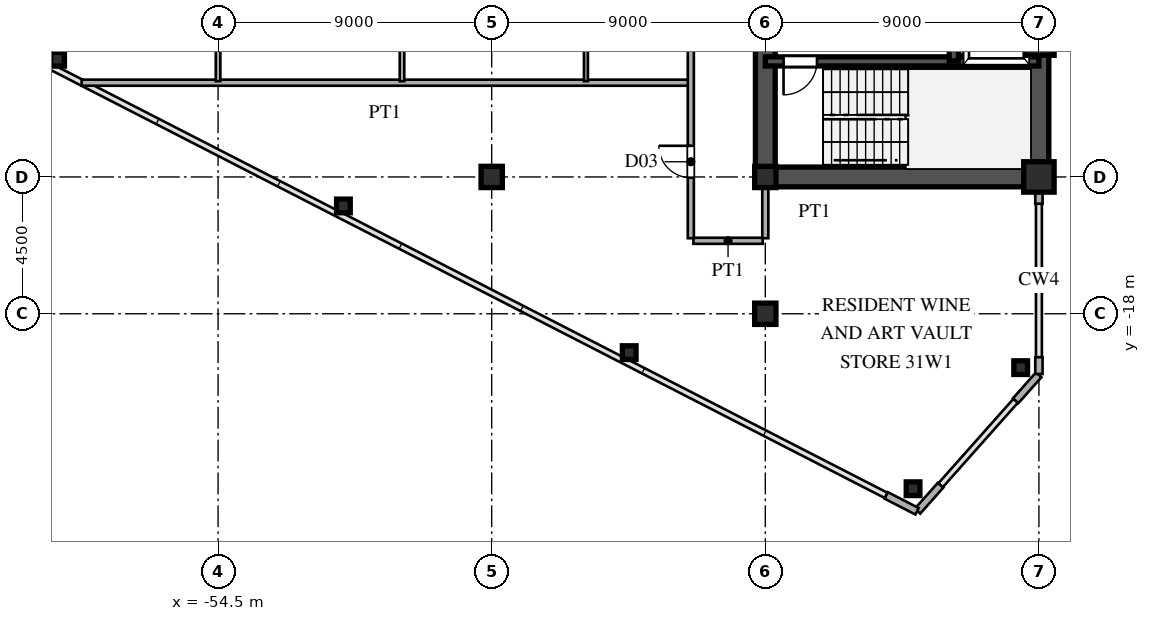
"""IFC4 building model, lengths in metres.
Left out: names, types, materials, properties, quantities, classifications, styles, units other than length and angle.
Written with IfcOpenShell. Run it as: python <this file> out.ifc"""

import sys

from ifc_helpers import new_model, si_unit, direction, frame, frame_2d, origin, origin_2d, place, context, subcontext, project, spatial, rectangle, hollow_rectangle, i_section, extrude, source, transform, mapped, element, fill, save


model = new_model("IFC4")
c1 = context("Model", 3, precision=1e-05, world=origin(), true_north=direction((0.0, 1.0)))
c2 = subcontext(c1, "Body", "Model", "MODEL_VIEW")
j1 = project(units=[si_unit("LENGTHUNIT", "METRE"), si_unit("PLANEANGLEUNIT", "RADIAN")], contexts=[c1])
p1 = place(None, origin())
s1 = spatial("IfcSite", under=j1, at=p1, CompositionType="ELEMENT")
p2 = place(p1, origin())
s2 = spatial("IfcBuilding", under=s1, at=p2, CompositionType="ELEMENT")
p3 = place(p2, frame((0.0, 0.0, 117.6)))
s3 = spatial("IfcBuildingStorey", under=s2, at=p3, CompositionType="ELEMENT", Elevation=117.6)
m1 = source(origin(), c2, "Body", "SweptSolid", [
    extrude(hollow_rectangle(XDim=1.0, YDim=1.0, WallThickness=0.042, at=origin_2d()), origin(), (0.0, 0.0, 1.0), 3.6),
])
for number, where, z_axis, x_axis in (
    (1, (-27.5, -13.5, 0.0), (0.0, 0.0, 1.0), (1.0, 0.0, 0.0)),
    (2, (-27.5, -9.0, 0.0), (0.0, 0.0, 1.0), (1.0, 0.0, 0.0)),
):
    element("IfcColumn", number, at=place(p3, frame(where, z_axis=z_axis, x_axis=x_axis)), inside=s3, PredefinedType="COLUMN", context=c2, shape_type="MappedRepresentation", body=[
        mapped(m1, transform((0.0, 0.0, 0.0), scale=1.0)),
    ])
m2 = source(origin(), c2, "Body", "SweptSolid", [
    extrude(i_section(OverallWidth=0.7, OverallDepth=0.7, WebThickness=0.028, FlangeThickness=0.045, at=origin_2d()), origin(), (0.0, 0.0, 1.0), 3.6),
])
for number, where, z_axis, x_axis in (
    (3, (-36.5, -18.0, 0.0), (0.0, 0.0, 1.0), (1.0, 0.0, 0.0)),
    (4, (-36.5, -13.5, 0.0), (0.0, 0.0, 1.0), (1.0, 0.0, 0.0)),
    (5, (-45.5, -13.5, 0.0), (0.0, 0.0, 1.0), (1.0, 0.0, 0.0)),
):
    element("IfcColumn", number, at=place(p3, frame(where, z_axis=z_axis, x_axis=x_axis)), inside=s3, PredefinedType="COLUMN", context=c2, shape_type="MappedRepresentation", body=[
        mapped(m2, transform((0.0, 0.0, 0.0), scale=1.0)),
    ])
m3 = source(origin(), c2, "Body", "SweptSolid", [
    extrude(hollow_rectangle(XDim=0.45, YDim=0.45, WallThickness=0.018, at=origin_2d()), origin(), (0.0, 0.0, 1.0), 3.6),
])
for number, where, z_axis, x_axis in (
    (6, (-28.1, -19.772, 0.0), (0.0, 0.0, 1.0), (1.0, 0.0, 0.0)),
    (7, (-31.64, -23.754, 0.0), (0.0, 0.0, 1.0), (1.0, 0.0, 0.0)),
    (8, (-40.976, -19.278, 0.0), (0.0, 0.0, 1.0), (1.0, 0.0, 0.0)),
    (9, (-50.377, -14.453, 0.0), (0.0, 0.0, 1.0), (1.0, 0.0, 0.0)),
    (10, (-59.779, -9.629, 0.0), (0.0, 0.0, 1.0), (1.0, 0.0, 0.0)),
):
    element("IfcColumn", number, at=place(p3, frame(where, z_axis=z_axis, x_axis=x_axis)), inside=s3, PredefinedType="COLUMN", context=c2, shape_type="MappedRepresentation", body=[
        mapped(m3, transform((0.0, 0.0, 0.0), scale=1.0)),
    ])
p4 = place(p3, frame((-27.5, -19.98, 0.0), z_axis=(0.0, 0.0, 1.0), x_axis=(0.0, 1.0, 0.0)))
e11 = element("IfcWall", 11, at=p4, inside=s3, PredefinedType="SOLIDWALL", context=c2, shape_type="SweptSolid", body=[
    extrude(rectangle(XDim=0.55, YDim=0.24, at=frame_2d((0.275, 0.0))), origin(), (0.0, 0.0, 1.0), 3.38),
])
p5 = place(p3, frame((-27.5, -14.38, 0.0), z_axis=(0.0, 0.0, 1.0), x_axis=(0.0, 1.0, 0.0)))
e12 = element("IfcWall", 12, at=p5, inside=s3, PredefinedType="SOLIDWALL", context=c2, shape_type="SweptSolid", body=[
    extrude(rectangle(XDim=0.55, YDim=0.24, at=frame_2d((0.275, 0.0))), origin(), (0.0, 0.0, 1.0), 2.88),
])
p6 = place(p3, frame((-32.523, -23.975, 0.0), z_axis=(0.0, 0.0, 1.0), x_axis=(0.889797395748, -0.456355776255, 0.0)))
e13 = element("IfcWall", 13, at=p6, inside=s3, PredefinedType="SOLIDWALL", context=c2, shape_type="SweptSolid", body=[
    extrude(rectangle(XDim=1.14, YDim=0.24, at=frame_2d((0.57, 0.0))), origin(), (0.0, 0.0, 1.0), 3.38),
])
for number, where, z_axis, x_axis in (
    (14, (-31.493, -24.492, 0.0), (0.0, 0.0, 1.0), (0.664, 0.747, 0.0)),
    (15, (-28.264, -20.86, 0.0), (0.0, 0.0, 1.0), (0.664, 0.747, 0.0)),
):
    element("IfcWall", number, at=place(p3, frame(where, z_axis=z_axis, x_axis=x_axis)), inside=s3, PredefinedType="SOLIDWALL", context=c2, shape_type="SweptSolid", body=[
        extrude(rectangle(XDim=1.14, YDim=0.24, at=frame_2d((0.57, 0.0))), origin(), (0.0, 0.0, 1.0), 3.38),
    ])
p7 = place(p3, frame((-27.5, -13.5, 0.0), z_axis=(0.0, 0.0, 1.0), x_axis=(0.0, 1.0, 0.0)))
e16 = element("IfcWall", 16, at=p7, inside=s3, PredefinedType="SHEAR", context=c2, shape_type="SweptSolid", body=[
    extrude(rectangle(XDim=12.2, YDim=0.65, at=frame_2d((6.1, 0.0))), origin(), (0.0, 0.0, 1.0), 3.38),
])
p8 = place(p3, frame((-36.5, -13.5, 0.0), z_axis=(0.0, 0.0, 1.0), x_axis=(1.0, 0.0, 0.0)))
e17 = element("IfcWall", 17, at=p8, inside=s3, PredefinedType="SHEAR", context=c2, shape_type="SweptSolid", body=[
    extrude(rectangle(XDim=9.0, YDim=0.65, at=frame_2d((4.5, 0.0))), origin(), (0.0, 0.0, 1.0), 3.38),
])
p9 = place(p3, frame((-36.5, -13.65, 0.0), z_axis=(0.0, 0.0, 1.0), x_axis=(0.0, 1.0, 0.0)))
e18 = element("IfcWall", 18, at=p9, inside=s3, PredefinedType="SHEAR", context=c2, shape_type="SweptSolid", body=[
    extrude(rectangle(XDim=7.15, YDim=0.65, at=frame_2d((3.575, 0.0))), origin(), (0.0, 0.0, 1.0), 3.38),
])
p10 = place(p9, frame((4.675, 0.0, 0.0)))
e19 = element("IfcOpeningElement", 19, at=p10, cuts=e18, PredefinedType="OPENING", context=c2, shape_type="SweptSolid", body=[
    extrude(rectangle(XDim=1.15, YDim=2.2, at=frame_2d((0.575, 1.1))), frame((0.0, 0.335, 0.0), z_axis=(0.0, -1.0, 0.0), x_axis=(1.0, 0.0, 0.0)), (0.0, 0.0, 1.0), 0.67),
])
p11 = place(p3, frame((-36.5, -9.7, 0.0), z_axis=(0.0, 0.0, 1.0), x_axis=(1.0, 0.0, 0.0)))
e20 = element("IfcWall", 20, at=p11, inside=s3, PredefinedType="SHEAR", context=c2, shape_type="SweptSolid", body=[
    extrude(rectangle(XDim=9.0, YDim=0.3, at=frame_2d((4.5, 0.0))), origin(), (0.0, 0.0, 1.0), 3.38),
])
p12 = place(p11, frame((0.6, 0.0, 0.0)))
e21 = element("IfcOpeningElement", 21, at=p12, cuts=e20, PredefinedType="OPENING", context=c2, shape_type="SweptSolid", body=[
    extrude(rectangle(XDim=1.1, YDim=2.2, at=frame_2d((0.55, 1.1))), frame((0.0, 0.16, 0.0), z_axis=(0.0, -1.0, 0.0), x_axis=(1.0, 0.0, 0.0)), (0.0, 0.0, 1.0), 0.32),
])
p13 = place(p3, frame((-30.3, -9.68, 0.0), z_axis=(0.0, 0.0, 1.0), x_axis=(0.0, 1.0, 0.0)))
e22 = element("IfcWall", 22, at=p13, inside=s3, PredefinedType="SHEAR", context=c2, shape_type="SweptSolid", body=[
    extrude(rectangle(XDim=2.56, YDim=0.3, at=frame_2d((1.28, 0.0))), origin(), (0.0, 0.0, 1.0), 3.38),
])
p14 = place(p13, frame((0.68, 0.0, 0.0)))
e23 = element("IfcOpeningElement", 23, at=p14, cuts=e22, PredefinedType="OPENING", context=c2, shape_type="SweptSolid", body=[
    extrude(rectangle(XDim=1.2, YDim=2.25, at=frame_2d((0.6, 1.125))), frame((0.0, 0.16, 0.0), z_axis=(0.0, -1.0, 0.0), x_axis=(1.0, 0.0, 0.0)), (0.0, 0.0, 1.0), 0.32),
])
p15 = place(p3, frame((-38.865, -15.6, 0.0), z_axis=(0.0, 0.0, 1.0), x_axis=(1.0, 0.0, 0.0)))
e24 = element("IfcWall", 24, at=p15, inside=s3, PredefinedType="PARTITIONING", context=c2, shape_type="SweptSolid", body=[
    extrude(rectangle(XDim=2.28, YDim=0.2, at=frame_2d((1.14, 0.0))), origin(), (0.0, 0.0, 1.0), 3.38),
])
p16 = place(p3, frame((-58.988, -10.4, 0.0), z_axis=(0.0, 0.0, 1.0), x_axis=(1.0, 0.0, 0.0)))
e25 = element("IfcWall", 25, at=p16, inside=s3, PredefinedType="PARTITIONING", context=c2, shape_type="SweptSolid", body=[
    extrude(rectangle(XDim=19.958, YDim=0.2, at=frame_2d((9.979, 0.0))), origin(), (0.0, 0.0, 1.0), 3.38),
])
p17 = place(p3, frame((-54.5, -10.35, 0.0), z_axis=(0.0, 0.0, 1.0), x_axis=(0.0, 1.0, 0.0)))
e26 = element("IfcWall", 26, at=p17, inside=s3, PredefinedType="PARTITIONING", context=c2, shape_type="SweptSolid", body=[
    extrude(rectangle(XDim=23.082, YDim=0.15, at=frame_2d((11.541, 0.0))), origin(), (0.0, 0.0, 1.0), 2.78),
])
p18 = place(p17, frame((6.475, 0.0, 0.0)))
e27 = element("IfcOpeningElement", 27, at=p18, cuts=e26, PredefinedType="OPENING", context=c2, shape_type="SweptSolid", body=[
    extrude(rectangle(XDim=0.95, YDim=2.15, at=frame_2d((0.475, 1.075))), frame((0.0, 0.085, 0.0), z_axis=(0.0, -1.0, 0.0), x_axis=(1.0, 0.0, 0.0)), (0.0, 0.0, 1.0), 0.17),
])
p19 = place(p17, frame((11.142, 0.0, 0.0)))
e28 = element("IfcOpeningElement", 28, at=p19, cuts=e26, PredefinedType="OPENING", context=c2, shape_type="SweptSolid", body=[
    extrude(rectangle(XDim=0.95, YDim=2.15, at=frame_2d((0.475, 1.075))), frame((0.0, 0.085, 0.0), z_axis=(0.0, -1.0, 0.0), x_axis=(1.0, 0.0, 0.0)), (0.0, 0.0, 1.0), 0.17),
])
p20 = place(p17, frame((20.575, 0.0, 0.0)))
e29 = element("IfcOpeningElement", 29, at=p20, cuts=e26, PredefinedType="OPENING", context=c2, shape_type="SweptSolid", body=[
    extrude(rectangle(XDim=0.95, YDim=2.15, at=frame_2d((0.475, 1.075))), frame((0.0, 0.085, 0.0), z_axis=(0.0, -1.0, 0.0), x_axis=(1.0, 0.0, 0.0)), (0.0, 0.0, 1.0), 0.17),
])
p21 = place(p17, frame((16.026, 0.0, 0.0)))
e30 = element("IfcOpeningElement", 30, at=p21, cuts=e26, PredefinedType="OPENING", context=c2, shape_type="SweptSolid", body=[
    extrude(rectangle(XDim=0.95, YDim=2.15, at=frame_2d((0.475, 1.075))), frame((0.0, 0.085, 0.0), z_axis=(0.0, -1.0, 0.0), x_axis=(1.0, 0.0, 0.0)), (0.0, 0.0, 1.0), 0.17),
])
p22 = place(p3, frame((-48.45, -10.35, 0.0), z_axis=(0.0, 0.0, 1.0), x_axis=(0.0, 1.0, 0.0)))
e31 = element("IfcWall", 31, at=p22, inside=s3, PredefinedType="PARTITIONING", context=c2, shape_type="SweptSolid", body=[
    extrude(rectangle(XDim=24.104, YDim=0.15, at=frame_2d((12.052, 0.0))), origin(), (0.0, 0.0, 1.0), 3.38),
])
p23 = place(p22, frame((6.475, 0.0, 0.0)))
e32 = element("IfcOpeningElement", 32, at=p23, cuts=e31, PredefinedType="OPENING", context=c2, shape_type="SweptSolid", body=[
    extrude(rectangle(XDim=0.95, YDim=2.15, at=frame_2d((0.475, 1.075))), frame((0.0, 0.085, 0.0), z_axis=(0.0, -1.0, 0.0), x_axis=(1.0, 0.0, 0.0)), (0.0, 0.0, 1.0), 0.17),
])
p24 = place(p22, frame((1.808, 0.0, 0.0)))
e33 = element("IfcOpeningElement", 33, at=p24, cuts=e31, PredefinedType="OPENING", context=c2, shape_type="SweptSolid", body=[
    extrude(rectangle(XDim=0.95, YDim=2.15, at=frame_2d((0.475, 1.075))), frame((0.0, 0.085, 0.0), z_axis=(0.0, -1.0, 0.0), x_axis=(1.0, 0.0, 0.0)), (0.0, 0.0, 1.0), 0.17),
])
p25 = place(p22, frame((21.128, 0.0, 0.0)))
e34 = element("IfcOpeningElement", 34, at=p25, cuts=e31, PredefinedType="OPENING", context=c2, shape_type="SweptSolid", body=[
    extrude(rectangle(XDim=0.95, YDim=2.15, at=frame_2d((0.475, 1.075))), frame((0.0, 0.085, 0.0), z_axis=(0.0, -1.0, 0.0), x_axis=(1.0, 0.0, 0.0)), (0.0, 0.0, 1.0), 0.17),
])
p26 = place(p22, frame((16.026, 0.0, 0.0)))
e35 = element("IfcOpeningElement", 35, at=p26, cuts=e31, PredefinedType="OPENING", context=c2, shape_type="SweptSolid", body=[
    extrude(rectangle(XDim=0.95, YDim=2.15, at=frame_2d((0.475, 1.075))), frame((0.0, 0.085, 0.0), z_axis=(0.0, -1.0, 0.0), x_axis=(1.0, 0.0, 0.0)), (0.0, 0.0, 1.0), 0.17),
])
p27 = place(p3, frame((-42.4, -10.35, 0.0), z_axis=(0.0, 0.0, 1.0), x_axis=(0.0, 1.0, 0.0)))
e36 = element("IfcWall", 36, at=p27, inside=s3, PredefinedType="PARTITIONING", context=c2, shape_type="SweptSolid", body=[
    extrude(rectangle(XDim=9.233, YDim=0.13, at=frame_2d((4.617, 0.0))), origin(), (0.0, 0.0, 1.0), 3.38),
])
p28 = place(p27, frame((6.475, 0.0, 0.0)))
e37 = element("IfcOpeningElement", 37, at=p28, cuts=e36, PredefinedType="OPENING", context=c2, shape_type="SweptSolid", body=[
    extrude(rectangle(XDim=0.95, YDim=2.15, at=frame_2d((0.475, 1.075))), frame((0.0, 0.075, 0.0), z_axis=(0.0, -1.0, 0.0), x_axis=(1.0, 0.0, 0.0)), (0.0, 0.0, 1.0), 0.15),
])
p29 = place(p3, frame((-38.95, -15.515, 0.0), z_axis=(0.0, 0.0, 1.0), x_axis=(0.0, 1.0, 0.0)))
e38 = element("IfcWall", 38, at=p29, inside=s3, PredefinedType="PARTITIONING", context=c2, shape_type="SweptSolid", body=[
    extrude(rectangle(XDim=31.03, YDim=0.2, at=frame_2d((15.515, 0.0))), origin(), (0.0, 0.0, 1.0), 3.38),
])
p30 = place(p29, frame((1.99, 0.0, 0.0)))
e39 = element("IfcOpeningElement", 39, at=p30, cuts=e38, PredefinedType="OPENING", context=c2, shape_type="SweptSolid", body=[
    extrude(rectangle(XDim=1.05, YDim=2.25, at=frame_2d((0.525, 1.125))), frame((0.0, 0.11, 0.0), z_axis=(0.0, -1.0, 0.0), x_axis=(1.0, 0.0, 0.0)), (0.0, 0.0, 1.0), 0.22),
])
p31 = place(p29, frame((11.38, 0.0, 0.0)))
e40 = element("IfcOpeningElement", 40, at=p31, cuts=e38, PredefinedType="OPENING", context=c2, shape_type="SweptSolid", body=[
    extrude(rectangle(XDim=1.05, YDim=2.25, at=frame_2d((0.525, 1.125))), frame((0.0, 0.11, 0.0), z_axis=(0.0, -1.0, 0.0), x_axis=(1.0, 0.0, 0.0)), (0.0, 0.0, 1.0), 0.22),
])
p32 = place(p29, frame((24.617, 0.0, 0.0)))
e41 = element("IfcOpeningElement", 41, at=p32, cuts=e38, PredefinedType="OPENING", context=c2, shape_type="SweptSolid", body=[
    extrude(rectangle(XDim=1.05, YDim=2.25, at=frame_2d((0.525, 1.125))), frame((0.0, 0.11, 0.0), z_axis=(0.0, -1.0, 0.0), x_axis=(1.0, 0.0, 0.0)), (0.0, 0.0, 1.0), 0.22),
])
p33 = place(p3, frame((-36.5, -15.515, 0.0), z_axis=(0.0, 0.0, 1.0), x_axis=(0.0, 1.0, 0.0)))
e42 = element("IfcWall", 42, at=p33, inside=s3, PredefinedType="PARTITIONING", context=c2, shape_type="SweptSolid", body=[
    extrude(rectangle(XDim=1.685, YDim=0.2, at=frame_2d((0.842, 0.0))), origin(), (0.0, 0.0, 1.0), 2.78),
])
m4 = source(origin(), c2, "Body", "SweptSolid", [
    extrude(rectangle(XDim=1.1, YDim=2.2, at=frame_2d((0.55, 1.1))), frame((0.0, 0.025, 0.0), z_axis=(0.0, -1.0, 0.0), x_axis=(1.0, 0.0, 0.0)), (0.0, 0.0, 1.0), 0.05),
])
p34 = place(p12, frame((1.1, 0.0, 0.0), z_axis=(0.0, 0.0, 1.0), x_axis=(-1.0, 0.0, 0.0)))
e43 = element("IfcDoor", 43, at=p34, inside=s3, OperationType="SINGLE_SWING_LEFT", PredefinedType="DOOR", context=c2, shape_type="MappedRepresentation", body=[
    mapped(m4, transform((0.0, 0.0, 0.0), scale=1.0)),
])
fill(e21, e43)
m5 = source(origin(), c2, "Body", "SweptSolid", [
    extrude(rectangle(XDim=1.05, YDim=2.25, at=frame_2d((0.525, 1.125))), frame((0.0, 0.025, 0.0), z_axis=(0.0, -1.0, 0.0), x_axis=(1.0, 0.0, 0.0)), (0.0, 0.0, 1.0), 0.05),
])
p35 = place(p30, origin())
e44 = element("IfcDoor", 44, at=p35, inside=s3, OperationType="SINGLE_SWING_RIGHT", PredefinedType="DOOR", context=c2, shape_type="MappedRepresentation", body=[
    mapped(m5, transform((0.0, 0.0, 0.0), scale=1.0)),
])
fill(e39, e44)
save(model, sys.argv[1])
